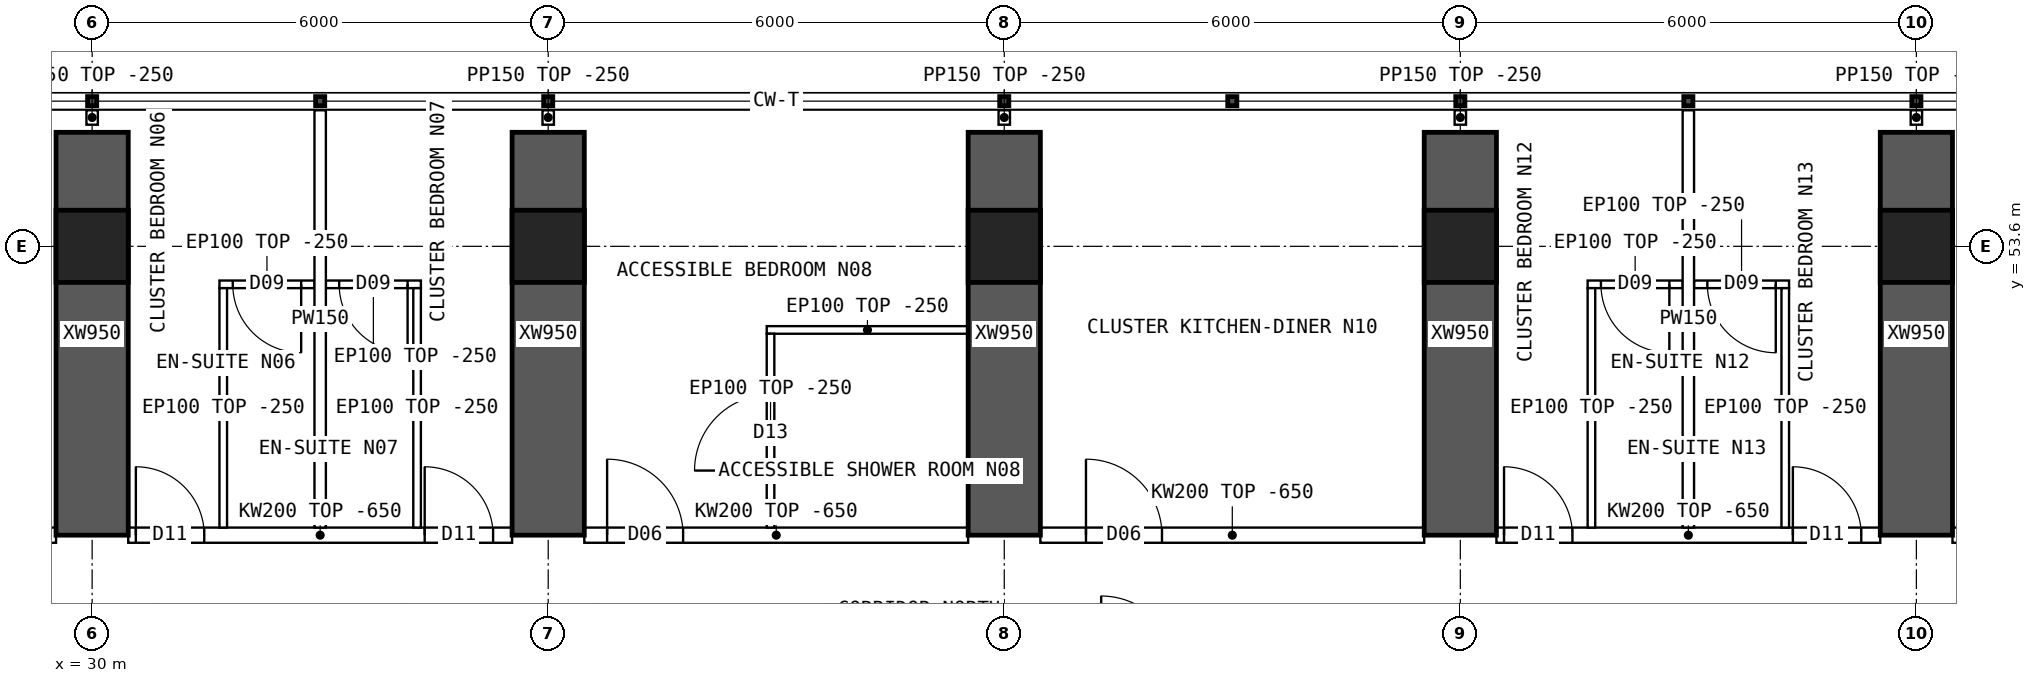
"""IFC4 building model, lengths in metres.
Left out: names, types, materials, properties, quantities, classifications, styles, units other than length and angle.
Written with IfcOpenShell. Run it as: python <this file> out.ifc"""

import sys

from ifc_helpers import new_model, si_unit, direction, frame, frame_2d, origin, origin_2d, place, context, subcontext, project, spatial, polyline, rectangle, hollow_rectangle, outline, extrude, element, fill, save


model = new_model("IFC4")
c1 = context("Model", 3, precision=1e-05, world=origin(), true_north=direction((0.0, 1.0)))
c2 = subcontext(c1, "Body", "Model", "MODEL_VIEW")
j1 = project(units=[si_unit("LENGTHUNIT", "METRE"), si_unit("PLANEANGLEUNIT", "RADIAN")], contexts=[c1])
p1 = place(None, origin())
s1 = spatial("IfcSite", under=j1, at=p1, CompositionType="ELEMENT")
p2 = place(p1, origin())
s2 = spatial("IfcBuilding", under=s1, at=p2, CompositionType="ELEMENT")
p3 = place(p2, frame((0.0, 0.0, 121.9)))
s3 = spatial("IfcBuildingStorey", under=s2, at=p3, CompositionType="ELEMENT", Elevation=121.9)
for number, where, z_axis, x_axis in (
    (1, (30.0, 53.6, 0.0), (0.0, 0.0, 1.0), (1.0, 0.0, 0.0)),
    (2, (36.0, 53.6, 0.0), (0.0, 0.0, 1.0), (1.0, 0.0, 0.0)),
    (3, (42.0, 53.6, 0.0), (0.0, 0.0, 1.0), (1.0, 0.0, 0.0)),
    (4, (48.0, 53.6, 0.0), (0.0, 0.0, 1.0), (1.0, 0.0, 0.0)),
    (5, (54.0, 53.6, 0.0), (0.0, 0.0, 1.0), (1.0, 0.0, 0.0)),
):
    element("IfcColumn", number, at=place(p3, frame(where, z_axis=z_axis, x_axis=x_axis)), inside=s3, PredefinedType="COLUMN", context=c2, shape_type="SweptSolid", body=[
        extrude(hollow_rectangle(XDim=0.95, YDim=0.95, WallThickness=0.095, at=origin_2d()), origin(), (0.0, 0.0, 1.0), 3.75),
    ])
for number, where, z_axis, x_axis in (
    (6, (30.0, 49.8, 0.0), (0.0, 0.0, 1.0), (0.0, 1.0, 0.0)),
    (7, (36.0, 49.8, 0.0), (0.0, 0.0, 1.0), (0.0, 1.0, 0.0)),
    (8, (42.0, 49.8, 0.0), (0.0, 0.0, 1.0), (0.0, 1.0, 0.0)),
    (9, (48.0, 49.8, 0.0), (0.0, 0.0, 1.0), (0.0, 1.0, 0.0)),
    (10, (54.0, 49.8, 0.0), (0.0, 0.0, 1.0), (0.0, 1.0, 0.0)),
):
    element("IfcWall", number, at=place(p3, frame(where, z_axis=z_axis, x_axis=x_axis)), inside=s3, PredefinedType="SHEAR", context=c2, shape_type="SweptSolid", body=[
        extrude(rectangle(XDim=5.3, YDim=0.95, at=frame_2d((2.65, 0.0))), origin(), (0.0, 0.0, 1.0), 3.75),
    ])
p4 = place(p3, frame((24.475, 49.8, 0.0), z_axis=(0.0, 0.0, 1.0), x_axis=(1.0, 0.0, 0.0)))
e11 = element("IfcWall", 11, at=p4, inside=s3, PredefinedType="SOLIDWALL", context=c2, shape_type="SweptSolid", body=[
    extrude(outline(polyline([(0.0, 0.0), (5.05, 0.0), (5.05, 3.1), (0.0, 3.1), (0.0, 0.0)])), frame((0.0, 0.1, 0.0), z_axis=(0.0, -1.0, 0.0), x_axis=(1.0, 0.0, 0.0)), (0.0, 0.0, 1.0), 0.2),
])
p5 = place(p4, frame((0.1, 0.0, 0.0)))
e12 = element("IfcOpeningElement", 12, at=p5, cuts=e11, PredefinedType="OPENING", context=c2, shape_type="SweptSolid", body=[
    extrude(rectangle(XDim=0.9, YDim=2.1, at=frame_2d((0.45, 1.05))), frame((0.0, 0.11, 0.0), z_axis=(0.0, -1.0, 0.0), x_axis=(1.0, 0.0, 0.0)), (0.0, 0.0, 1.0), 0.22),
])
p6 = place(p4, frame((3.9, 0.0, 0.0)))
e13 = element("IfcOpeningElement", 13, at=p6, cuts=e11, PredefinedType="OPENING", context=c2, shape_type="SweptSolid", body=[
    extrude(rectangle(XDim=0.9, YDim=2.1, at=frame_2d((0.45, 1.05))), frame((0.0, 0.11, 0.0), z_axis=(0.0, -1.0, 0.0), x_axis=(1.0, 0.0, 0.0)), (0.0, 0.0, 1.0), 0.22),
])
p7 = place(p3, frame((30.475, 49.8, 0.0), z_axis=(0.0, 0.0, 1.0), x_axis=(1.0, 0.0, 0.0)))
e14 = element("IfcWall", 14, at=p7, inside=s3, PredefinedType="SOLIDWALL", context=c2, shape_type="SweptSolid", body=[
    extrude(outline(polyline([(0.0, 0.0), (5.05, 0.0), (5.05, 3.1), (0.0, 3.1), (0.0, 0.0)])), frame((0.0, 0.1, 0.0), z_axis=(0.0, -1.0, 0.0), x_axis=(1.0, 0.0, 0.0)), (0.0, 0.0, 1.0), 0.2),
])
p8 = place(p7, frame((0.1, 0.0, 0.0)))
e15 = element("IfcOpeningElement", 15, at=p8, cuts=e14, PredefinedType="OPENING", context=c2, shape_type="SweptSolid", body=[
    extrude(rectangle(XDim=0.9, YDim=2.1, at=frame_2d((0.45, 1.05))), frame((0.0, 0.11, 0.0), z_axis=(0.0, -1.0, 0.0), x_axis=(1.0, 0.0, 0.0)), (0.0, 0.0, 1.0), 0.22),
])
p9 = place(p7, frame((3.9, 0.0, 0.0)))
e16 = element("IfcOpeningElement", 16, at=p9, cuts=e14, PredefinedType="OPENING", context=c2, shape_type="SweptSolid", body=[
    extrude(rectangle(XDim=0.9, YDim=2.1, at=frame_2d((0.45, 1.05))), frame((0.0, 0.11, 0.0), z_axis=(0.0, -1.0, 0.0), x_axis=(1.0, 0.0, 0.0)), (0.0, 0.0, 1.0), 0.22),
])
p10 = place(p3, frame((36.475, 49.8, 0.0), z_axis=(0.0, 0.0, 1.0), x_axis=(1.0, 0.0, 0.0)))
e17 = element("IfcWall", 17, at=p10, inside=s3, PredefinedType="SOLIDWALL", context=c2, shape_type="SweptSolid", body=[
    extrude(outline(polyline([(0.0, 0.0), (5.05, 0.0), (5.05, 3.1), (0.0, 3.1), (0.0, 0.0)])), frame((0.0, 0.1, 0.0), z_axis=(0.0, -1.0, 0.0), x_axis=(1.0, 0.0, 0.0)), (0.0, 0.0, 1.0), 0.2),
])
p11 = place(p10, frame((0.3, 0.0, 0.0)))
e18 = element("IfcOpeningElement", 18, at=p11, cuts=e17, PredefinedType="OPENING", context=c2, shape_type="SweptSolid", body=[
    extrude(rectangle(XDim=1.0, YDim=2.1, at=frame_2d((0.5, 1.05))), frame((0.0, 0.11, 0.0), z_axis=(0.0, -1.0, 0.0), x_axis=(1.0, 0.0, 0.0)), (0.0, 0.0, 1.0), 0.22),
])
p12 = place(p3, frame((42.475, 49.8, 0.0), z_axis=(0.0, 0.0, 1.0), x_axis=(1.0, 0.0, 0.0)))
e19 = element("IfcWall", 19, at=p12, inside=s3, PredefinedType="SOLIDWALL", context=c2, shape_type="SweptSolid", body=[
    extrude(outline(polyline([(0.0, 0.0), (5.05, 0.0), (5.05, 3.1), (0.0, 3.1), (0.0, 0.0)])), frame((0.0, 0.1, 0.0), z_axis=(0.0, -1.0, 0.0), x_axis=(1.0, 0.0, 0.0)), (0.0, 0.0, 1.0), 0.2),
])
p13 = place(p12, frame((0.6, 0.0, 0.0)))
e20 = element("IfcOpeningElement", 20, at=p13, cuts=e19, PredefinedType="OPENING", context=c2, shape_type="SweptSolid", body=[
    extrude(rectangle(XDim=1.0, YDim=2.1, at=frame_2d((0.5, 1.05))), frame((0.0, 0.11, 0.0), z_axis=(0.0, -1.0, 0.0), x_axis=(1.0, 0.0, 0.0)), (0.0, 0.0, 1.0), 0.22),
])
p14 = place(p3, frame((48.475, 49.8, 0.0), z_axis=(0.0, 0.0, 1.0), x_axis=(1.0, 0.0, 0.0)))
e21 = element("IfcWall", 21, at=p14, inside=s3, PredefinedType="SOLIDWALL", context=c2, shape_type="SweptSolid", body=[
    extrude(outline(polyline([(0.0, 0.0), (5.05, 0.0), (5.05, 3.1), (0.0, 3.1), (0.0, 0.0)])), frame((0.0, 0.1, 0.0), z_axis=(0.0, -1.0, 0.0), x_axis=(1.0, 0.0, 0.0)), (0.0, 0.0, 1.0), 0.2),
])
p15 = place(p14, frame((0.1, 0.0, 0.0)))
e22 = element("IfcOpeningElement", 22, at=p15, cuts=e21, PredefinedType="OPENING", context=c2, shape_type="SweptSolid", body=[
    extrude(rectangle(XDim=0.9, YDim=2.1, at=frame_2d((0.45, 1.05))), frame((0.0, 0.11, 0.0), z_axis=(0.0, -1.0, 0.0), x_axis=(1.0, 0.0, 0.0)), (0.0, 0.0, 1.0), 0.22),
])
p16 = place(p14, frame((3.9, 0.0, 0.0)))
e23 = element("IfcOpeningElement", 23, at=p16, cuts=e21, PredefinedType="OPENING", context=c2, shape_type="SweptSolid", body=[
    extrude(rectangle(XDim=0.9, YDim=2.1, at=frame_2d((0.45, 1.05))), frame((0.0, 0.11, 0.0), z_axis=(0.0, -1.0, 0.0), x_axis=(1.0, 0.0, 0.0)), (0.0, 0.0, 1.0), 0.22),
])
p17 = place(p3, frame((54.475, 49.8, 0.0), z_axis=(0.0, 0.0, 1.0), x_axis=(1.0, 0.0, 0.0)))
e24 = element("IfcWall", 24, at=p17, inside=s3, PredefinedType="SOLIDWALL", context=c2, shape_type="SweptSolid", body=[
    extrude(outline(polyline([(0.0, 0.0), (5.05, 0.0), (5.05, 3.1), (0.0, 3.1), (0.0, 0.0)])), frame((0.0, 0.1, 0.0), z_axis=(0.0, -1.0, 0.0), x_axis=(1.0, 0.0, 0.0)), (0.0, 0.0, 1.0), 0.2),
])
p18 = place(p17, frame((0.1, 0.0, 0.0)))
e25 = element("IfcOpeningElement", 25, at=p18, cuts=e24, PredefinedType="OPENING", context=c2, shape_type="SweptSolid", body=[
    extrude(rectangle(XDim=0.9, YDim=2.1, at=frame_2d((0.45, 1.05))), frame((0.0, 0.11, 0.0), z_axis=(0.0, -1.0, 0.0), x_axis=(1.0, 0.0, 0.0)), (0.0, 0.0, 1.0), 0.22),
])
p19 = place(p17, frame((3.9, 0.0, 0.0)))
e26 = element("IfcOpeningElement", 26, at=p19, cuts=e24, PredefinedType="OPENING", context=c2, shape_type="SweptSolid", body=[
    extrude(rectangle(XDim=0.9, YDim=2.1, at=frame_2d((0.45, 1.05))), frame((0.0, 0.11, 0.0), z_axis=(0.0, -1.0, 0.0), x_axis=(1.0, 0.0, 0.0)), (0.0, 0.0, 1.0), 0.22),
])
p20 = place(p3, frame((33.0, 55.39, 0.0), z_axis=(0.0, 0.0, 1.0), x_axis=(0.0, -1.0, 0.0)))
e27 = element("IfcWall", 27, at=p20, inside=s3, PredefinedType="PARTITIONING", context=c2, shape_type="SweptSolid", body=[
    extrude(outline(polyline([(0.0, 0.0), (5.49, 0.0), (5.49, 3.1), (5.442, 3.1), (5.44, 3.5), (1.992, 3.5), (1.99, 3.1), (1.592, 3.1), (1.59, 3.5), (0.0, 3.5), (0.0, 0.0)])), frame((0.0, 0.075, 0.0), z_axis=(0.0, -1.0, 0.0), x_axis=(1.0, 0.0, 0.0)), (0.0, 0.0, 1.0), 0.15),
])
p21 = place(p3, frame((31.675, 53.1, 0.0), z_axis=(0.0, 0.0, 1.0), x_axis=(1.0, 0.0, 0.0)))
e28 = element("IfcWall", 28, at=p21, inside=s3, PredefinedType="PARTITIONING", context=c2, shape_type="SweptSolid", body=[
    extrude(rectangle(XDim=1.25, YDim=0.1, at=frame_2d((0.625, 0.0))), origin(), (0.0, 0.0, 1.0), 3.5),
])
p22 = place(p21, frame((0.175, 0.0, 0.0)))
e29 = element("IfcOpeningElement", 29, at=p22, cuts=e28, PredefinedType="OPENING", context=c2, shape_type="SweptSolid", body=[
    extrude(rectangle(XDim=0.9, YDim=2.1, at=frame_2d((0.45, 1.05))), frame((0.0, 0.06, 0.0), z_axis=(0.0, -1.0, 0.0), x_axis=(1.0, 0.0, 0.0)), (0.0, 0.0, 1.0), 0.12),
])
p23 = place(p3, frame((31.725, 53.05, 0.0), z_axis=(0.0, 0.0, 1.0), x_axis=(0.0, -1.0, 0.0)))
e30 = element("IfcWall", 30, at=p23, inside=s3, PredefinedType="PARTITIONING", context=c2, shape_type="SweptSolid", body=[
    extrude(outline(polyline([(0.0, 0.0), (3.15, 0.0), (3.15, 3.1), (3.102, 3.1), (3.1, 3.5), (0.0, 3.5), (0.0, 0.0)])), frame((0.0, 0.05, 0.0), z_axis=(0.0, -1.0, 0.0), x_axis=(1.0, 0.0, 0.0)), (0.0, 0.0, 1.0), 0.1),
])
p24 = place(p3, frame((33.075, 53.1, 0.0), z_axis=(0.0, 0.0, 1.0), x_axis=(1.0, 0.0, 0.0)))
e31 = element("IfcWall", 31, at=p24, inside=s3, PredefinedType="PARTITIONING", context=c2, shape_type="SweptSolid", body=[
    extrude(rectangle(XDim=1.25, YDim=0.1, at=frame_2d((0.625, 0.0))), origin(), (0.0, 0.0, 1.0), 3.5),
])
p25 = place(p24, frame((0.175, 0.0, 0.0)))
e32 = element("IfcOpeningElement", 32, at=p25, cuts=e31, PredefinedType="OPENING", context=c2, shape_type="SweptSolid", body=[
    extrude(rectangle(XDim=0.9, YDim=2.1, at=frame_2d((0.45, 1.05))), frame((0.0, 0.06, 0.0), z_axis=(0.0, -1.0, 0.0), x_axis=(1.0, 0.0, 0.0)), (0.0, 0.0, 1.0), 0.12),
])
p26 = place(p3, frame((34.275, 53.05, 0.0), z_axis=(0.0, 0.0, 1.0), x_axis=(0.0, -1.0, 0.0)))
e33 = element("IfcWall", 33, at=p26, inside=s3, PredefinedType="PARTITIONING", context=c2, shape_type="SweptSolid", body=[
    extrude(outline(polyline([(0.0, 0.0), (3.15, 0.0), (3.15, 3.1), (3.102, 3.1), (3.1, 3.5), (0.0, 3.5), (0.0, 0.0)])), frame((0.0, 0.05, 0.0), z_axis=(0.0, -1.0, 0.0), x_axis=(1.0, 0.0, 0.0)), (0.0, 0.0, 1.0), 0.1),
])
p27 = place(p3, frame((38.875, 52.5, 0.0), z_axis=(0.0, 0.0, 1.0), x_axis=(1.0, 0.0, 0.0)))
e34 = element("IfcWall", 34, at=p27, inside=s3, PredefinedType="PARTITIONING", context=c2, shape_type="SweptSolid", body=[
    extrude(rectangle(XDim=2.65, YDim=0.1, at=frame_2d((1.325, 0.0))), origin(), (0.0, 0.0, 1.0), 3.5),
])
p28 = place(p3, frame((38.925, 52.45, 0.0), z_axis=(0.0, 0.0, 1.0), x_axis=(0.0, -1.0, 0.0)))
e35 = element("IfcWall", 35, at=p28, inside=s3, PredefinedType="PARTITIONING", context=c2, shape_type="SweptSolid", body=[
    extrude(outline(polyline([(0.0, 0.0), (2.55, 0.0), (2.55, 3.1), (2.502, 3.1), (2.5, 3.5), (0.0, 3.5), (0.0, 0.0)])), frame((0.0, 0.05, 0.0), z_axis=(0.0, -1.0, 0.0), x_axis=(1.0, 0.0, 0.0)), (0.0, 0.0, 1.0), 0.1),
])
p29 = place(p28, frame((0.8, 0.0, 0.0)))
e36 = element("IfcOpeningElement", 36, at=p29, cuts=e35, PredefinedType="OPENING", context=c2, shape_type="SweptSolid", body=[
    extrude(rectangle(XDim=1.0, YDim=2.1, at=frame_2d((0.5, 1.05))), frame((0.0, 0.06, 0.0), z_axis=(0.0, -1.0, 0.0), x_axis=(1.0, 0.0, 0.0)), (0.0, 0.0, 1.0), 0.12),
])
p30 = place(p3, frame((51.0, 55.39, 0.0), z_axis=(0.0, 0.0, 1.0), x_axis=(0.0, -1.0, 0.0)))
e37 = element("IfcWall", 37, at=p30, inside=s3, PredefinedType="PARTITIONING", context=c2, shape_type="SweptSolid", body=[
    extrude(outline(polyline([(0.0, 0.0), (5.49, 0.0), (5.49, 3.1), (5.442, 3.1), (5.44, 3.5), (1.992, 3.5), (1.99, 3.1), (1.592, 3.1), (1.59, 3.5), (0.0, 3.5), (0.0, 0.0)])), frame((0.0, 0.075, 0.0), z_axis=(0.0, -1.0, 0.0), x_axis=(1.0, 0.0, 0.0)), (0.0, 0.0, 1.0), 0.15),
])
p31 = place(p3, frame((49.675, 53.1, 0.0), z_axis=(0.0, 0.0, 1.0), x_axis=(1.0, 0.0, 0.0)))
e38 = element("IfcWall", 38, at=p31, inside=s3, PredefinedType="PARTITIONING", context=c2, shape_type="SweptSolid", body=[
    extrude(rectangle(XDim=1.25, YDim=0.1, at=frame_2d((0.625, 0.0))), origin(), (0.0, 0.0, 1.0), 3.5),
])
p32 = place(p31, frame((0.175, 0.0, 0.0)))
e39 = element("IfcOpeningElement", 39, at=p32, cuts=e38, PredefinedType="OPENING", context=c2, shape_type="SweptSolid", body=[
    extrude(rectangle(XDim=0.9, YDim=2.1, at=frame_2d((0.45, 1.05))), frame((0.0, 0.06, 0.0), z_axis=(0.0, -1.0, 0.0), x_axis=(1.0, 0.0, 0.0)), (0.0, 0.0, 1.0), 0.12),
])
p33 = place(p3, frame((49.725, 53.05, 0.0), z_axis=(0.0, 0.0, 1.0), x_axis=(0.0, -1.0, 0.0)))
e40 = element("IfcWall", 40, at=p33, inside=s3, PredefinedType="PARTITIONING", context=c2, shape_type="SweptSolid", body=[
    extrude(outline(polyline([(0.0, 0.0), (3.15, 0.0), (3.15, 3.1), (3.102, 3.1), (3.1, 3.5), (0.0, 3.5), (0.0, 0.0)])), frame((0.0, 0.05, 0.0), z_axis=(0.0, -1.0, 0.0), x_axis=(1.0, 0.0, 0.0)), (0.0, 0.0, 1.0), 0.1),
])
p34 = place(p3, frame((51.075, 53.1, 0.0), z_axis=(0.0, 0.0, 1.0), x_axis=(1.0, 0.0, 0.0)))
e41 = element("IfcWall", 41, at=p34, inside=s3, PredefinedType="PARTITIONING", context=c2, shape_type="SweptSolid", body=[
    extrude(rectangle(XDim=1.25, YDim=0.1, at=frame_2d((0.625, 0.0))), origin(), (0.0, 0.0, 1.0), 3.5),
])
p35 = place(p34, frame((0.175, 0.0, 0.0)))
e42 = element("IfcOpeningElement", 42, at=p35, cuts=e41, PredefinedType="OPENING", context=c2, shape_type="SweptSolid", body=[
    extrude(rectangle(XDim=0.9, YDim=2.1, at=frame_2d((0.45, 1.05))), frame((0.0, 0.06, 0.0), z_axis=(0.0, -1.0, 0.0), x_axis=(1.0, 0.0, 0.0)), (0.0, 0.0, 1.0), 0.12),
])
p36 = place(p3, frame((52.275, 53.05, 0.0), z_axis=(0.0, 0.0, 1.0), x_axis=(0.0, -1.0, 0.0)))
e43 = element("IfcWall", 43, at=p36, inside=s3, PredefinedType="PARTITIONING", context=c2, shape_type="SweptSolid", body=[
    extrude(outline(polyline([(0.0, 0.0), (3.15, 0.0), (3.15, 3.1), (3.102, 3.1), (3.1, 3.5), (0.0, 3.5), (0.0, 0.0)])), frame((0.0, 0.05, 0.0), z_axis=(0.0, -1.0, 0.0), x_axis=(1.0, 0.0, 0.0)), (0.0, 0.0, 1.0), 0.1),
])
for number, where, z_axis, x_axis in (
    (44, (30.0, 55.2, 0.0), (0.0, 0.0, 1.0), (0.0, 1.0, 0.0)),
    (45, (36.0, 55.2, 0.0), (0.0, 0.0, 1.0), (0.0, 1.0, 0.0)),
    (46, (42.0, 55.2, 0.0), (0.0, 0.0, 1.0), (0.0, 1.0, 0.0)),
    (47, (48.0, 55.2, 0.0), (0.0, 0.0, 1.0), (0.0, 1.0, 0.0)),
    (48, (54.0, 55.2, 0.0), (0.0, 0.0, 1.0), (0.0, 1.0, 0.0)),
):
    element("IfcWall", number, at=place(p3, frame(where, z_axis=z_axis, x_axis=x_axis)), inside=s3, PredefinedType="PARTITIONING", context=c2, shape_type="SweptSolid", body=[
        extrude(rectangle(XDim=0.19, YDim=0.15, at=frame_2d((0.095, 0.0))), origin(), (0.0, 0.0, 1.0), 3.5),
    ])
p37 = place(p22, origin())
e49 = element("IfcDoor", 49, at=p37, inside=s3, OperationType="SINGLE_SWING_RIGHT", PredefinedType="DOOR", context=c2, shape_type="SweptSolid", body=[
    extrude(rectangle(XDim=0.9, YDim=2.1, at=frame_2d((0.45, 1.05))), frame((0.0, 0.025, 0.0), z_axis=(0.0, -1.0, 0.0), x_axis=(1.0, 0.0, 0.0)), (0.0, 0.0, 1.0), 0.05),
])
fill(e29, e49)
p38 = place(p8, origin())
e50 = element("IfcDoor", 50, at=p38, inside=s3, OperationType="SINGLE_SWING_LEFT", PredefinedType="DOOR", context=c2, shape_type="SweptSolid", body=[
    extrude(rectangle(XDim=0.9, YDim=2.1, at=frame_2d((0.45, 1.05))), frame((0.0, 0.025, 0.0), z_axis=(0.0, -1.0, 0.0), x_axis=(1.0, 0.0, 0.0)), (0.0, 0.0, 1.0), 0.05),
])
fill(e15, e50)
p39 = place(p25, origin())
e51 = element("IfcDoor", 51, at=p39, inside=s3, OperationType="SINGLE_SWING_RIGHT", PredefinedType="DOOR", context=c2, shape_type="SweptSolid", body=[
    extrude(rectangle(XDim=0.9, YDim=2.1, at=frame_2d((0.45, 1.05))), frame((0.0, 0.025, 0.0), z_axis=(0.0, -1.0, 0.0), x_axis=(1.0, 0.0, 0.0)), (0.0, 0.0, 1.0), 0.05),
])
fill(e32, e51)
p40 = place(p9, origin())
e52 = element("IfcDoor", 52, at=p40, inside=s3, OperationType="SINGLE_SWING_LEFT", PredefinedType="DOOR", context=c2, shape_type="SweptSolid", body=[
    extrude(rectangle(XDim=0.9, YDim=2.1, at=frame_2d((0.45, 1.05))), frame((0.0, 0.025, 0.0), z_axis=(0.0, -1.0, 0.0), x_axis=(1.0, 0.0, 0.0)), (0.0, 0.0, 1.0), 0.05),
])
fill(e16, e52)
p41 = place(p29, origin())
e53 = element("IfcDoor", 53, at=p41, inside=s3, OperationType="SINGLE_SWING_RIGHT", PredefinedType="DOOR", context=c2, shape_type="SweptSolid", body=[
    extrude(rectangle(XDim=1.0, YDim=2.1, at=frame_2d((0.5, 1.05))), frame((0.0, 0.025, 0.0), z_axis=(0.0, -1.0, 0.0), x_axis=(1.0, 0.0, 0.0)), (0.0, 0.0, 1.0), 0.05),
])
fill(e36, e53)
p42 = place(p11, origin())
e54 = element("IfcDoor", 54, at=p42, inside=s3, OperationType="SINGLE_SWING_LEFT", PredefinedType="DOOR", context=c2, shape_type="SweptSolid", body=[
    extrude(rectangle(XDim=1.0, YDim=2.1, at=frame_2d((0.5, 1.05))), frame((0.0, 0.025, 0.0), z_axis=(0.0, -1.0, 0.0), x_axis=(1.0, 0.0, 0.0)), (0.0, 0.0, 1.0), 0.05),
])
fill(e18, e54)
p43 = place(p13, origin())
e55 = element("IfcDoor", 55, at=p43, inside=s3, OperationType="SINGLE_SWING_LEFT", PredefinedType="DOOR", context=c2, shape_type="SweptSolid", body=[
    extrude(rectangle(XDim=1.0, YDim=2.1, at=frame_2d((0.5, 1.05))), frame((0.0, 0.025, 0.0), z_axis=(0.0, -1.0, 0.0), x_axis=(1.0, 0.0, 0.0)), (0.0, 0.0, 1.0), 0.05),
])
fill(e20, e55)
p44 = place(p32, origin())
e56 = element("IfcDoor", 56, at=p44, inside=s3, OperationType="SINGLE_SWING_RIGHT", PredefinedType="DOOR", context=c2, shape_type="SweptSolid", body=[
    extrude(rectangle(XDim=0.9, YDim=2.1, at=frame_2d((0.45, 1.05))), frame((0.0, 0.025, 0.0), z_axis=(0.0, -1.0, 0.0), x_axis=(1.0, 0.0, 0.0)), (0.0, 0.0, 1.0), 0.05),
])
fill(e39, e56)
p45 = place(p15, origin())
e57 = element("IfcDoor", 57, at=p45, inside=s3, OperationType="SINGLE_SWING_LEFT", PredefinedType="DOOR", context=c2, shape_type="SweptSolid", body=[
    extrude(rectangle(XDim=0.9, YDim=2.1, at=frame_2d((0.45, 1.05))), frame((0.0, 0.025, 0.0), z_axis=(0.0, -1.0, 0.0), x_axis=(1.0, 0.0, 0.0)), (0.0, 0.0, 1.0), 0.05),
])
fill(e22, e57)
p46 = place(p35, origin())
e58 = element("IfcDoor", 58, at=p46, inside=s3, OperationType="SINGLE_SWING_RIGHT", PredefinedType="DOOR", context=c2, shape_type="SweptSolid", body=[
    extrude(rectangle(XDim=0.9, YDim=2.1, at=frame_2d((0.45, 1.05))), frame((0.0, 0.025, 0.0), z_axis=(0.0, -1.0, 0.0), x_axis=(1.0, 0.0, 0.0)), (0.0, 0.0, 1.0), 0.05),
])
fill(e42, e58)
p47 = place(p16, origin())
e59 = element("IfcDoor", 59, at=p47, inside=s3, OperationType="SINGLE_SWING_LEFT", PredefinedType="DOOR", context=c2, shape_type="SweptSolid", body=[
    extrude(rectangle(XDim=0.9, YDim=2.1, at=frame_2d((0.45, 1.05))), frame((0.0, 0.025, 0.0), z_axis=(0.0, -1.0, 0.0), x_axis=(1.0, 0.0, 0.0)), (0.0, 0.0, 1.0), 0.05),
])
fill(e23, e59)
save(model, sys.argv[1])
